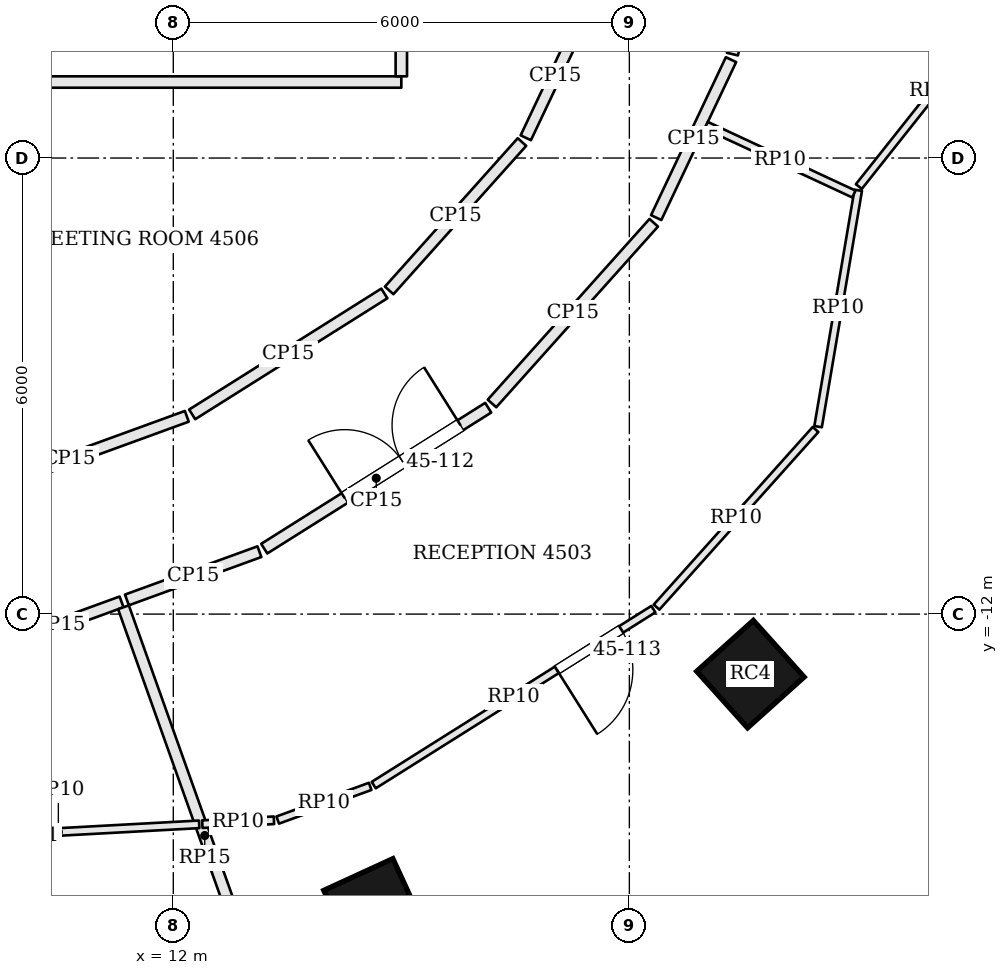
"""IFC4 building model, lengths in metres.
Left out: names, types, materials, properties, quantities, classifications, styles, units other than length and angle.
Written with IfcOpenShell. Run it as: python <this file> out.ifc"""

import sys

from ifc_helpers import new_model, si_unit, direction, frame, frame_2d, origin, origin_2d, place, context, subcontext, project, spatial, rectangle, extrude, element, fill, save


model = new_model("IFC4")
c1 = context("Model", 3, precision=1e-05, world=origin(), true_north=direction((0.0, 1.0)))
c2 = subcontext(c1, "Body", "Model", "MODEL_VIEW")
j1 = project(units=[si_unit("LENGTHUNIT", "METRE"), si_unit("PLANEANGLEUNIT", "RADIAN")], contexts=[c1])
p1 = place(None, origin())
s1 = spatial("IfcSite", under=j1, at=p1, CompositionType="ELEMENT")
p2 = place(p1, origin())
s2 = spatial("IfcBuilding", under=s1, at=p2, CompositionType="ELEMENT")
p3 = place(p2, frame((0.0, 0.0, 185.7)))
s3 = spatial("IfcBuildingStorey", under=s2, at=p3, CompositionType="ELEMENT", Elevation=185.7)
for number, where, z_axis, x_axis in (
    (1, (14.643, -15.881, 0.0), (0.0, 0.0, 1.0), (0.909, 0.417, 0.0)),
    (2, (19.593, -12.79, 0.0), (0.0, 0.0, 1.0), (0.744, 0.668, 0.0)),
):
    element("IfcColumn", number, at=place(p3, frame(where, z_axis=z_axis, x_axis=x_axis)), inside=s3, PredefinedType="COLUMN", context=c2, shape_type="SweptSolid", body=[
        extrude(rectangle(XDim=1.0, YDim=1.0, at=origin_2d()), origin(), (0.0, 0.0, 1.0), 3.9),
    ])
p4 = place(p3, frame((9.676, -12.438, 0.0), z_axis=(0.0, 0.0, 1.0), x_axis=(0.939630331536, 0.342191233169, 0.0)))
e3 = element("IfcWall", 3, at=p4, inside=s3, PredefinedType="PARTITIONING", context=c2, shape_type="SweptSolid", body=[
    extrude(rectangle(XDim=1.75, YDim=0.15, at=frame_2d((0.875, 0.0))), origin(), (0.0, 0.0, 1.0), 3.084),
])
p5 = place(p3, frame((13.483, -17.916, 0.0), z_axis=(0.0, 0.0, 1.0), x_axis=(-0.33549690644, 0.942041307889, 0.0)))
e4 = element("IfcWall", 4, at=p5, inside=s3, PredefinedType="PARTITIONING", context=c2, shape_type="SweptSolid", body=[
    extrude(rectangle(XDim=6.375, YDim=0.15, at=frame_2d((3.188, 0.0))), origin(), (0.0, 0.0, 1.0), 3.084),
])
p6 = place(p3, frame((11.39, -11.814, 0.0), z_axis=(0.0, 0.0, 1.0), x_axis=(0.939639632456, 0.342165692491, 0.0)))
e5 = element("IfcWall", 5, at=p6, inside=s3, PredefinedType="PARTITIONING", context=c2, shape_type="SweptSolid", body=[
    extrude(rectangle(XDim=1.855, YDim=0.15, at=frame_2d((0.928, 0.0))), origin(), (0.0, 0.0, 1.0), 3.084),
])
p7 = place(p3, frame((13.197, -11.139, 0.0), z_axis=(0.0, 0.0, 1.0), x_axis=(0.846390903833, 0.532562144644, 0.0)))
e6 = element("IfcWall", 6, at=p7, inside=s3, PredefinedType="PARTITIONING", context=c2, shape_type="SweptSolid", body=[
    extrude(rectangle(XDim=3.481, YDim=0.15, at=frame_2d((1.741, 0.0))), origin(), (0.0, 0.0, 1.0), 3.084),
])
p8 = place(p7, frame((1.25, 0.0, 0.0)))
e7 = element("IfcOpeningElement", 7, at=p8, cuts=e6, PredefinedType="OPENING", context=c2, shape_type="SweptSolid", body=[
    extrude(rectangle(XDim=1.8, YDim=2.1, at=frame_2d((0.9, 1.05))), frame((0.0, 0.085, 0.0), z_axis=(0.0, -1.0, 0.0), x_axis=(1.0, 0.0, 0.0)), (0.0, 0.0, 1.0), 0.17),
])
p9 = place(p3, frame((16.193, -9.229, 0.0), z_axis=(0.0, 0.0, 1.0), x_axis=(0.666882089048, 0.745163256815, 0.0)))
e8 = element("IfcWall", 8, at=p9, inside=s3, PredefinedType="PARTITIONING", context=c2, shape_type="SweptSolid", body=[
    extrude(rectangle(XDim=3.19, YDim=0.15, at=frame_2d((1.595, 0.0))), origin(), (0.0, 0.0, 1.0), 3.084),
])
p10 = place(p3, frame((18.353, -6.784, 0.0), z_axis=(0.0, 0.0, 1.0), x_axis=(0.428086344739, 0.903737838894, 0.0)))
e9 = element("IfcWall", 9, at=p10, inside=s3, PredefinedType="PARTITIONING", context=c2, shape_type="SweptSolid", body=[
    extrude(rectangle(XDim=2.3, YDim=0.15, at=frame_2d((1.15, 0.0))), origin(), (0.0, 0.0, 1.0), 3.084),
])
p11 = place(p3, frame((19.355, -4.633, 0.0), z_axis=(0.0, 0.0, 1.0), x_axis=(0.236703930685, 0.971581828359, 0.0)))
e10 = element("IfcWall", 10, at=p11, inside=s3, PredefinedType="PARTITIONING", context=c2, shape_type="SweptSolid", body=[
    extrude(rectangle(XDim=1.626, YDim=0.15, at=frame_2d((0.813, 0.0))), origin(), (0.0, 0.0, 1.0), 3.084),
])
p12 = place(p3, frame((17.41, -4.102, 0.0), z_axis=(0.0, 0.0, 1.0), x_axis=(-0.428074720318, -0.903743345107, 0.0)))
e11 = element("IfcWall", 11, at=p12, inside=s3, PredefinedType="PARTITIONING", context=c2, shape_type="SweptSolid", body=[
    extrude(rectangle(XDim=1.806, YDim=0.15, at=frame_2d((0.903, 0.0))), origin(), (0.0, 0.0, 1.0), 3.084),
])
p13 = place(p3, frame((16.587, -5.789, 0.0), z_axis=(0.0, 0.0, 1.0), x_axis=(-0.666887460656, -0.745158449472, 0.0)))
e12 = element("IfcWall", 12, at=p13, inside=s3, PredefinedType="PARTITIONING", context=c2, shape_type="SweptSolid", body=[
    extrude(rectangle(XDim=2.62, YDim=0.15, at=frame_2d((1.31, 0.0))), origin(), (0.0, 0.0, 1.0), 3.084),
])
p14 = place(p3, frame((14.777, -7.781, 0.0), z_axis=(0.0, 0.0, 1.0), x_axis=(-0.846359741043, -0.532611667862, 0.0)))
e13 = element("IfcWall", 13, at=p14, inside=s3, PredefinedType="PARTITIONING", context=c2, shape_type="SweptSolid", body=[
    extrude(rectangle(XDim=2.987, YDim=0.15, at=frame_2d((1.494, 0.0))), origin(), (0.0, 0.0, 1.0), 3.084),
])
p15 = place(p3, frame((12.178, -9.398, 0.0), z_axis=(0.0, 0.0, 1.0), x_axis=(-0.939609240084, -0.342249143093, 0.0)))
e14 = element("IfcWall", 14, at=p15, inside=s3, PredefinedType="PARTITIONING", context=c2, shape_type="SweptSolid", body=[
    extrude(rectangle(XDim=3.292, YDim=0.15, at=frame_2d((1.646, 0.0))), origin(), (0.0, 0.0, 1.0), 3.084),
])
p16 = place(p3, frame((-14.925, -5.0, 0.0), z_axis=(0.0, 0.0, 1.0), x_axis=(1.0, 0.0, 0.0)))
e15 = element("IfcWall", 15, at=p16, inside=s3, PredefinedType="PARTITIONING", context=c2, shape_type="SweptSolid", body=[
    extrude(rectangle(XDim=29.925, YDim=0.15, at=frame_2d((14.962, 0.0))), origin(), (0.0, 0.0, 1.0), 3.084),
])
p17 = place(p16, frame((14.025, 0.0, 0.0)))
e16 = element("IfcOpeningElement", 16, at=p17, cuts=e15, PredefinedType="OPENING", context=c2, shape_type="SweptSolid", body=[
    extrude(rectangle(XDim=1.8, YDim=2.1, at=frame_2d((0.9, 1.05))), frame((0.0, 0.085, 0.0), z_axis=(0.0, -1.0, 0.0), x_axis=(1.0, 0.0, 0.0)), (0.0, 0.0, 1.0), 0.17),
])
p18 = place(p3, frame((15.0, -4.925, 0.0), z_axis=(0.0, 0.0, 1.0), x_axis=(0.0, 1.0, 0.0)))
e17 = element("IfcWall", 17, at=p18, inside=s3, PredefinedType="PARTITIONING", context=c2, shape_type="SweptSolid", body=[
    extrude(rectangle(XDim=12.583, YDim=0.15, at=frame_2d((6.292, 0.0))), origin(), (0.0, 0.0, 1.0), 3.084),
])
p19 = place(p18, frame((5.791, 0.0, 0.0)))
e18 = element("IfcOpeningElement", 18, at=p19, cuts=e17, PredefinedType="OPENING", context=c2, shape_type="SweptSolid", body=[
    extrude(rectangle(XDim=1.0, YDim=2.4, at=frame_2d((0.5, 1.2))), frame((0.0, 0.085, 0.0), z_axis=(0.0, -1.0, 0.0), x_axis=(1.0, 0.0, 0.0)), (0.0, 0.0, 1.0), 0.17),
])
p20 = place(p3, frame((12.34, -14.766, 0.0), z_axis=(0.0, 0.0, 1.0), x_axis=(-0.998525257467, -0.054289135192, 0.0)))
e19 = element("IfcWall", 19, at=p20, inside=s3, PredefinedType="PARTITIONING", context=c2, shape_type="SweptSolid", body=[
    extrude(rectangle(XDim=3.71, YDim=0.1, at=frame_2d((1.855, 0.0))), origin(), (0.0, 0.0, 1.0), 3.084),
])
p21 = place(p20, frame((2.35, 0.0, 0.0)))
e20 = element("IfcOpeningElement", 20, at=p21, cuts=e19, PredefinedType="OPENING", context=c2, shape_type="SweptSolid", body=[
    extrude(rectangle(XDim=0.9, YDim=2.1, at=frame_2d((0.45, 1.05))), frame((0.0, 0.06, 0.0), z_axis=(0.0, -1.0, 0.0), x_axis=(1.0, 0.0, 0.0)), (0.0, 0.0, 1.0), 0.12),
])
p22 = place(p3, frame((23.024, -3.85, 0.0), z_axis=(0.0, 0.0, 1.0), x_axis=(-0.621707275044, -0.783249681875, 0.0)))
e21 = element("IfcWall", 21, at=p22, inside=s3, PredefinedType="PARTITIONING", context=c2, shape_type="SweptSolid", body=[
    extrude(rectangle(XDim=3.224, YDim=0.1, at=frame_2d((1.612, 0.0))), origin(), (0.0, 0.0, 1.0), 3.084),
])
p23 = place(p3, frame((21.011, -6.424, 0.0), z_axis=(0.0, 0.0, 1.0), x_axis=(-0.167360753367, -0.985895723813, 0.0)))
e22 = element("IfcWall", 22, at=p23, inside=s3, PredefinedType="PARTITIONING", context=c2, shape_type="SweptSolid", body=[
    extrude(rectangle(XDim=3.154, YDim=0.1, at=frame_2d((1.577, 0.0))), origin(), (0.0, 0.0, 1.0), 3.084),
])
p24 = place(p3, frame((20.45, -9.571, 0.0), z_axis=(0.0, 0.0, 1.0), x_axis=(-0.666910888996, -0.745137481368, 0.0)))
e23 = element("IfcWall", 23, at=p24, inside=s3, PredefinedType="PARTITIONING", context=c2, shape_type="SweptSolid", body=[
    extrude(rectangle(XDim=3.136, YDim=0.1, at=frame_2d((1.568, 0.0))), origin(), (0.0, 0.0, 1.0), 3.084),
])
p25 = place(p3, frame((18.316, -11.935, 0.0), z_axis=(0.0, 0.0, 1.0), x_axis=(-0.84637539713, -0.532586788358, 0.0)))
e24 = element("IfcWall", 24, at=p25, inside=s3, PredefinedType="PARTITIONING", context=c2, shape_type="SweptSolid", body=[
    extrude(rectangle(XDim=4.346, YDim=0.1, at=frame_2d((2.173, 0.0))), origin(), (0.0, 0.0, 1.0), 3.084),
])
p26 = place(p25, frame((0.5, 0.0, 0.0)))
e25 = element("IfcOpeningElement", 25, at=p26, cuts=e24, PredefinedType="OPENING", context=c2, shape_type="SweptSolid", body=[
    extrude(rectangle(XDim=1.0, YDim=2.1, at=frame_2d((0.5, 1.05))), frame((0.0, 0.06, 0.0), z_axis=(0.0, -1.0, 0.0), x_axis=(1.0, 0.0, 0.0)), (0.0, 0.0, 1.0), 0.12),
])
p27 = place(p3, frame((14.59, -14.267, 0.0), z_axis=(0.0, 0.0, 1.0), x_axis=(-0.939589516809, -0.342303286433, 0.0)))
e26 = element("IfcWall", 26, at=p27, inside=s3, PredefinedType="PARTITIONING", context=c2, shape_type="SweptSolid", body=[
    extrude(rectangle(XDim=1.294, YDim=0.1, at=frame_2d((0.647, 0.0))), origin(), (0.0, 0.0, 1.0), 3.084),
])
p28 = place(p3, frame((13.324, -14.712, 0.0), z_axis=(0.0, 0.0, 1.0), x_axis=(-0.998522607903, -0.054337845986, 0.0)))
e27 = element("IfcWall", 27, at=p28, inside=s3, PredefinedType="PARTITIONING", context=c2, shape_type="SweptSolid", body=[
    extrude(rectangle(XDim=0.944, YDim=0.1, at=frame_2d((0.472, 0.0))), origin(), (0.0, 0.0, 1.0), 3.084),
])
p29 = place(p3, frame((19.011, -5.57, 0.0), z_axis=(0.0, 0.0, 1.0), x_axis=(0.90673833646, -0.421693714908, 0.0)))
e28 = element("IfcWall", 28, at=p29, inside=s3, PredefinedType="PARTITIONING", context=c2, shape_type="SweptSolid", body=[
    extrude(rectangle(XDim=2.143, YDim=0.1, at=frame_2d((1.071, 0.0))), origin(), (0.0, 0.0, 1.0), 3.084),
])
p30 = place(p8, origin())
e29 = element("IfcDoor", 29, at=p30, inside=s3, OperationType="DOUBLE_DOOR_SINGLE_SWING", PredefinedType="DOOR", context=c2, shape_type="SweptSolid", body=[
    extrude(rectangle(XDim=1.8, YDim=2.1, at=frame_2d((0.9, 1.05))), frame((0.0, 0.025, 0.0), z_axis=(0.0, -1.0, 0.0), x_axis=(1.0, 0.0, 0.0)), (0.0, 0.0, 1.0), 0.05),
])
fill(e7, e29)
p31 = place(p26, origin())
e30 = element("IfcDoor", 30, at=p31, inside=s3, OperationType="SINGLE_SWING_RIGHT", PredefinedType="DOOR", context=c2, shape_type="SweptSolid", body=[
    extrude(rectangle(XDim=1.0, YDim=2.1, at=frame_2d((0.5, 1.05))), frame((0.0, 0.025, 0.0), z_axis=(0.0, -1.0, 0.0), x_axis=(1.0, 0.0, 0.0)), (0.0, 0.0, 1.0), 0.05),
])
fill(e25, e30)
save(model, sys.argv[1])
